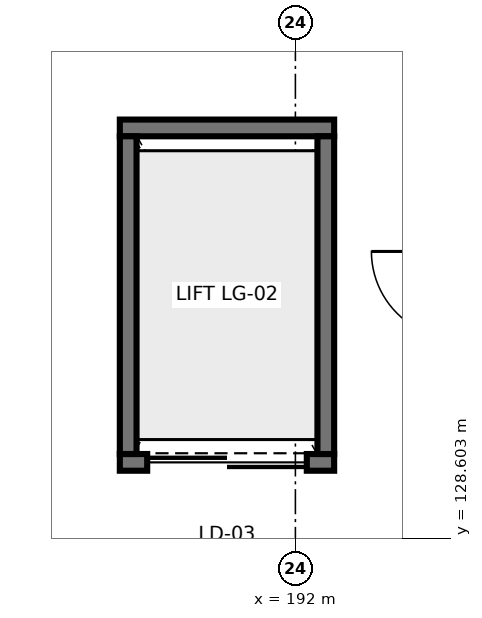
"""IFC4 building model, lengths in metres.
Left out: names, types, materials, properties, quantities, classifications, styles, units other than length and angle.
Written with IfcOpenShell. Run it as: python <this file> out.ifc"""

import sys

from ifc_helpers import new_model, si_unit, direction, frame, frame_2d, origin, place, context, subcontext, project, spatial, rectangle, extrude, element, fill, save


model = new_model("IFC4")
c1 = context("Model", 3, precision=1e-05, world=origin(), true_north=direction((0.0, 1.0)))
c2 = subcontext(c1, "Body", "Model", "MODEL_VIEW")
j1 = project(units=[si_unit("LENGTHUNIT", "METRE"), si_unit("PLANEANGLEUNIT", "RADIAN")], contexts=[c1])
p1 = place(None, origin())
s1 = spatial("IfcSite", under=j1, at=p1, CompositionType="ELEMENT")
p2 = place(p1, origin())
s2 = spatial("IfcBuilding", under=s1, at=p2, CompositionType="ELEMENT")
p3 = place(p2, frame((0.0, 0.0, 23.7)))
s3 = spatial("IfcBuildingStorey", under=s2, at=p3, CompositionType="ELEMENT", Elevation=23.7)
p4 = place(p3, frame((189.69, 129.6, 0.0), z_axis=(0.0, 0.0, 1.0), x_axis=(1.0, 0.0, 0.0)))
e1 = element("IfcWall", 1, at=p4, inside=s3, PredefinedType="SHEAR", context=c2, shape_type="SweptSolid", body=[
    extrude(rectangle(XDim=2.82, YDim=0.22, at=frame_2d((1.41, 0.0))), origin(), (0.0, 0.0, 1.0), 3.375),
])
p5 = place(p4, frame((0.36, 0.0, 0.0)))
e2 = element("IfcOpeningElement", 2, at=p5, cuts=e1, PredefinedType="OPENING", context=c2, shape_type="SweptSolid", body=[
    extrude(rectangle(XDim=2.1, YDim=2.45, at=frame_2d((1.05, 1.225))), frame((0.0, 0.12, 0.0), z_axis=(0.0, -1.0, 0.0), x_axis=(1.0, 0.0, 0.0)), (0.0, 0.0, 1.0), 0.24),
])
p6 = place(p3, frame((189.69, 134.0, 0.0), z_axis=(0.0, 0.0, 1.0), x_axis=(1.0, 0.0, 0.0)))
e3 = element("IfcWall", 3, at=p6, inside=s3, PredefinedType="SHEAR", context=c2, shape_type="SweptSolid", body=[
    extrude(rectangle(XDim=2.82, YDim=0.22, at=frame_2d((1.41, 0.0))), origin(), (0.0, 0.0, 1.0), 3.375),
])
p7 = place(p3, frame((189.8, 129.71, 0.0), z_axis=(0.0, 0.0, 1.0), x_axis=(0.0, 1.0, 0.0)))
e4 = element("IfcWall", 4, at=p7, inside=s3, PredefinedType="SHEAR", context=c2, shape_type="SweptSolid", body=[
    extrude(rectangle(XDim=4.18, YDim=0.22, at=frame_2d((2.09, 0.0))), origin(), (0.0, 0.0, 1.0), 3.94),
])
p8 = place(p3, frame((192.4, 129.71, 0.0), z_axis=(0.0, 0.0, 1.0), x_axis=(0.0, 1.0, 0.0)))
e5 = element("IfcWall", 5, at=p8, inside=s3, PredefinedType="SHEAR", context=c2, shape_type="SweptSolid", body=[
    extrude(rectangle(XDim=4.18, YDim=0.22, at=frame_2d((2.09, 0.0))), origin(), (0.0, 0.0, 1.0), 3.375),
])
p9 = place(p5, origin())
e6 = element("IfcDoor", 6, at=p9, inside=s3, OperationType="DOUBLE_DOOR_SLIDING", PredefinedType="DOOR", context=c2, shape_type="SweptSolid", body=[
    extrude(rectangle(XDim=2.1, YDim=2.45, at=frame_2d((1.05, 1.225))), frame((0.0, 0.025, 0.0), z_axis=(0.0, -1.0, 0.0), x_axis=(1.0, 0.0, 0.0)), (0.0, 0.0, 1.0), 0.05),
])
fill(e2, e6)
save(model, sys.argv[1])
